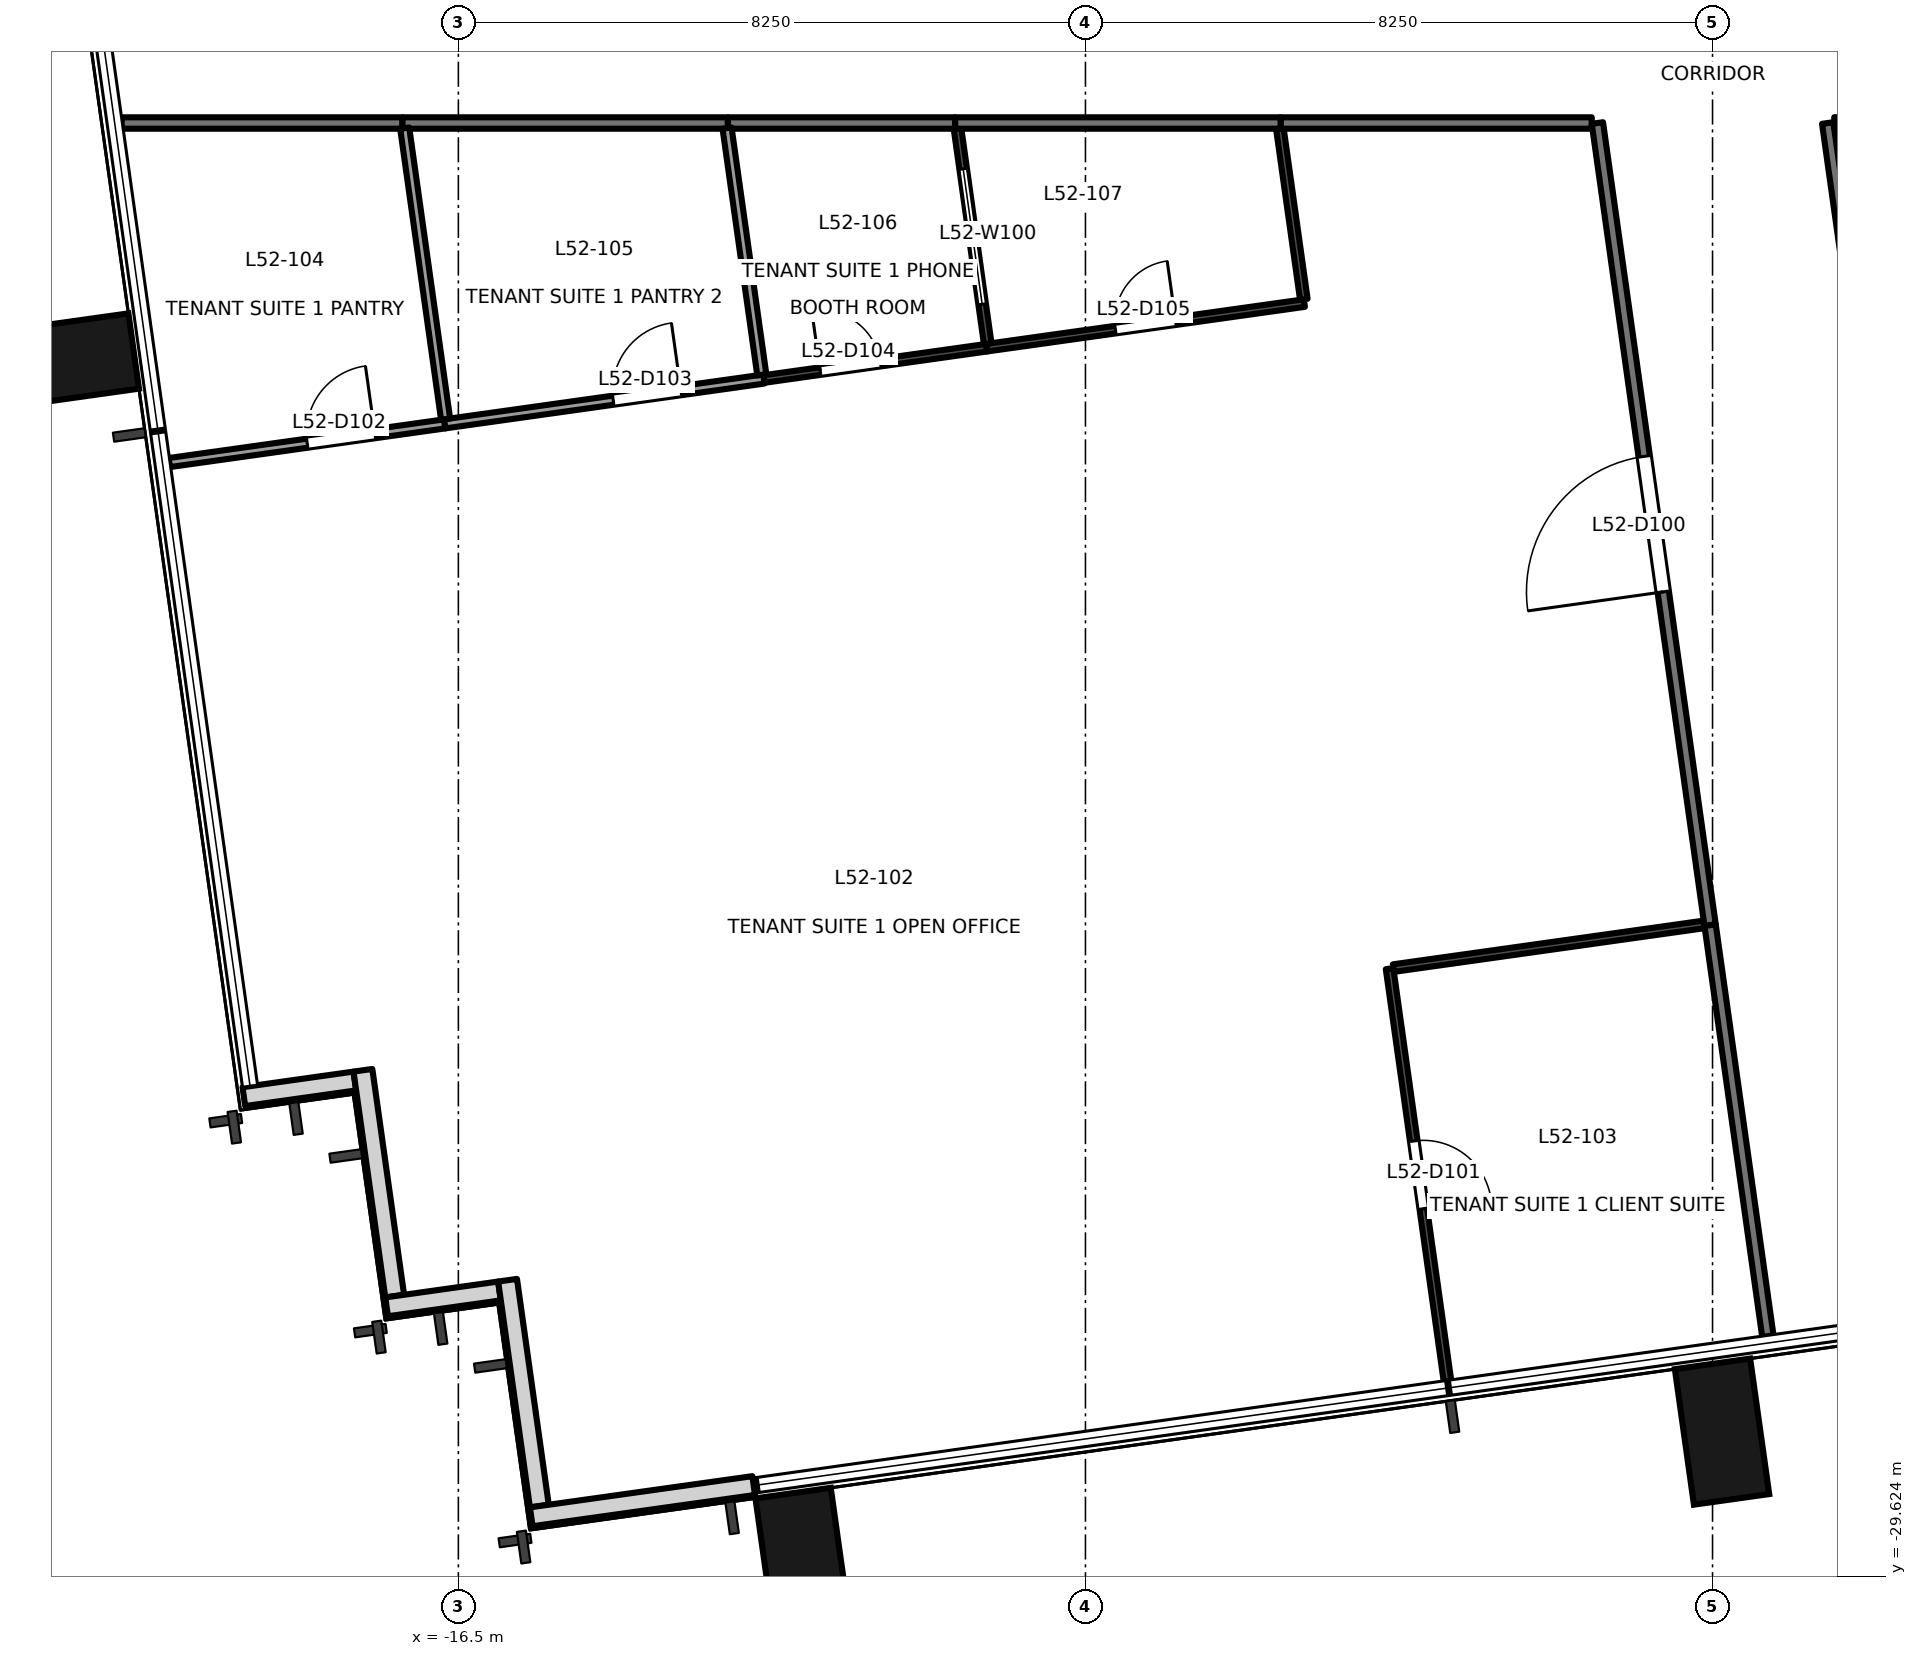
"""IFC4 building model, lengths in metres.
Left out: names, types, materials, properties, quantities, classifications, styles, units other than length and angle.
Written with IfcOpenShell. Run it as: python <this file> out.ifc"""

import sys

from ifc_helpers import new_model, si_unit, direction, frame, frame_2d, origin, origin_2d, place, context, subcontext, project, spatial, rectangle, extrude, element, fill, save


model = new_model("IFC4")
c1 = context("Model", 3, precision=1e-05, world=origin(), true_north=direction((0.0, 1.0)))
c2 = subcontext(c1, "Body", "Model", "MODEL_VIEW")
j1 = project(units=[si_unit("LENGTHUNIT", "METRE"), si_unit("PLANEANGLEUNIT", "RADIAN")], contexts=[c1])
p1 = place(None, origin())
s1 = spatial("IfcSite", under=j1, at=p1, CompositionType="ELEMENT")
p2 = place(p1, origin())
s2 = spatial("IfcBuilding", under=s1, at=p2, CompositionType="ELEMENT")
p3 = place(p2, frame((0.0, 0.0, 229.1)))
s3 = spatial("IfcBuildingStorey", under=s2, at=p3, CompositionType="ELEMENT", Elevation=229.1)
for number, where, z_axis, x_axis in (
    (1, (-11.971, -29.416, -0.2), (0.0, 0.0, 1.0), (0.99, 0.139, 0.0)),
    (2, (0.125, -27.716, -0.2), (0.0, 0.0, 1.0), (0.99, 0.139, 0.0)),
    (3, (-21.663, -13.625, -0.2), (0.0, 0.0, 1.0), (-0.139, 0.99, 0.0)),
):
    element("IfcColumn", number, at=place(p3, frame(where, z_axis=z_axis, x_axis=x_axis)), inside=s3, PredefinedType="COLUMN", context=c2, shape_type="SweptSolid", body=[
        extrude(rectangle(XDim=1.0, YDim=1.8, at=origin_2d()), origin(), (0.0, 0.0, 1.0), 3.9),
    ])
p4 = place(p3, frame((-19.322, -23.309, 0.0), z_axis=(0.0, 0.0, 1.0), x_axis=(0.990235520307, 0.13940449893, 0.0)))
e4 = element("IfcWall", 4, at=p4, inside=s3, PredefinedType="SOLIDWALL", context=c2, shape_type="SweptSolid", body=[
    extrude(rectangle(XDim=1.475, YDim=0.25, at=frame_2d((0.737, 0.0))), origin(), (0.0, 0.0, 1.0), 3.7),
])
p5 = place(p3, frame((-17.756, -22.962, 0.0), z_axis=(0.0, 0.0, 1.0), x_axis=(0.139393225799, -0.990237107263, 0.0)))
e5 = element("IfcWall", 5, at=p5, inside=s3, PredefinedType="SOLIDWALL", context=c2, shape_type="SweptSolid", body=[
    extrude(rectangle(XDim=3.0, YDim=0.25, at=frame_2d((1.5, 0.0))), origin(), (0.0, 0.0, 1.0), 3.7),
])
p6 = place(p3, frame((-17.444, -26.074, 0.0), z_axis=(0.0, 0.0, 1.0), x_axis=(0.990240434918, 0.139369584395, 0.0)))
e6 = element("IfcWall", 6, at=p6, inside=s3, PredefinedType="SOLIDWALL", context=c2, shape_type="SweptSolid", body=[
    extrude(rectangle(XDim=1.5, YDim=0.25, at=frame_2d((0.75, 0.0))), origin(), (0.0, 0.0, 1.0), 3.7),
])
p7 = place(p3, frame((-15.853, -25.724, 0.0), z_axis=(0.0, 0.0, 1.0), x_axis=(0.139302206688, -0.990249915532, 0.0)))
e7 = element("IfcWall", 7, at=p7, inside=s3, PredefinedType="SOLIDWALL", context=c2, shape_type="SweptSolid", body=[
    extrude(rectangle(XDim=3.0, YDim=0.25, at=frame_2d((1.5, 0.0))), origin(), (0.0, 0.0, 1.0), 3.7),
])
p8 = place(p3, frame((-15.541, -28.836, 0.0), z_axis=(0.0, 0.0, 1.0), x_axis=(0.990285396533, 0.139049751574, 0.0)))
e8 = element("IfcWall", 8, at=p8, inside=s3, PredefinedType="SOLIDWALL", context=c2, shape_type="SweptSolid", body=[
    extrude(rectangle(XDim=2.955, YDim=0.25, at=frame_2d((1.478, 0.0))), origin(), (0.0, 0.0, 1.0), 3.7),
])
p9 = place(p3, frame((-1.589, -10.5, 0.0), z_axis=(0.0, 0.0, 1.0), x_axis=(-1.0, 0.0, 0.0)))
e9 = element("IfcWall", 9, at=p9, inside=s3, PredefinedType="PARTITIONING", context=c2, shape_type="SweptSolid", body=[
    extrude(rectangle(XDim=4.094, YDim=0.15, at=frame_2d((2.047, 0.0))), origin(), (0.0, 0.0, 1.0), 2.8),
])
p10 = place(p3, frame((-0.032, -21.053, 0.0), z_axis=(0.0, 0.0, 1.0), x_axis=(-0.139153385275, 0.9902708394, 0.0)))
e10 = element("IfcWall", 10, at=p10, inside=s3, PredefinedType="PARTITIONING", context=c2, shape_type="SweptSolid", body=[
    extrude(rectangle(XDim=10.657, YDim=0.15, at=frame_2d((5.328, 0.0))), origin(), (0.0, 0.0, 1.0), 2.8),
])
p11 = place(p10, frame((4.428, 0.0, 0.0)))
e11 = element("IfcOpeningElement", 11, at=p11, cuts=e10, PredefinedType="OPENING", context=c2, shape_type="SweptSolid", body=[
    extrude(rectangle(XDim=1.8, YDim=2.1, at=frame_2d((0.9, 1.05))), frame((0.0, 0.085, 0.0), z_axis=(0.0, -1.0, 0.0), x_axis=(1.0, 0.0, 0.0)), (0.0, 0.0, 1.0), 0.171),
])
p12 = place(p3, frame((0.728, -26.46, 0.0), z_axis=(0.0, 0.0, 1.0), x_axis=(-0.139192487281, 0.990265343978, 0.0)))
e12 = element("IfcWall", 12, at=p12, inside=s3, PredefinedType="PARTITIONING", context=c2, shape_type="SweptSolid", body=[
    extrude(rectangle(XDim=5.46, YDim=0.15, at=frame_2d((2.73, 0.0))), origin(), (0.0, 0.0, 1.0), 2.8),
])
p13 = place(p3, frame((-17.235, -10.5, 0.0), z_axis=(0.0, 0.0, 1.0), x_axis=(-1.0, 0.0, 0.0)))
e13 = element("IfcWall", 13, at=p13, inside=s3, PredefinedType="PARTITIONING", context=c2, shape_type="SweptSolid", body=[
    extrude(rectangle(XDim=3.695, YDim=0.15, at=frame_2d((1.847, 0.0))), origin(), (0.0, 0.0, 1.0), 3.7),
])
p14 = place(p3, frame((-12.954, -10.5, 0.0), z_axis=(0.0, 0.0, 1.0), x_axis=(-1.0, 0.0, 0.0)))
e14 = element("IfcWall", 14, at=p14, inside=s3, PredefinedType="PARTITIONING", context=c2, shape_type="SweptSolid", body=[
    extrude(rectangle(XDim=4.281, YDim=0.15, at=frame_2d((2.141, 0.0))), origin(), (0.0, 0.0, 1.0), 3.7),
])
p15 = place(p3, frame((-9.964, -10.5, 0.0), z_axis=(0.0, 0.0, 1.0), x_axis=(-1.0, 0.0, 0.0)))
e15 = element("IfcWall", 15, at=p15, inside=s3, PredefinedType="PARTITIONING", context=c2, shape_type="SweptSolid", body=[
    extrude(rectangle(XDim=2.99, YDim=0.15, at=frame_2d((1.495, 0.0))), origin(), (0.0, 0.0, 1.0), 3.7),
])
p16 = place(p3, frame((-5.683, -10.5, 0.0), z_axis=(0.0, 0.0, 1.0), x_axis=(-1.0, 0.0, 0.0)))
e16 = element("IfcWall", 16, at=p16, inside=s3, PredefinedType="PARTITIONING", context=c2, shape_type="SweptSolid", body=[
    extrude(rectangle(XDim=4.281, YDim=0.15, at=frame_2d((2.141, 0.0))), origin(), (0.0, 0.0, 1.0), 2.8),
])
p17 = place(p3, frame((1.515, -10.5, 0.0), z_axis=(0.0, 0.0, 1.0), x_axis=(0.139146821365, -0.990271761742, 0.0)))
e17 = element("IfcWall", 17, at=p17, inside=s3, PredefinedType="PARTITIONING", context=c2, shape_type="SweptSolid", body=[
    extrude(rectangle(XDim=4.779, YDim=0.15, at=frame_2d((2.39, 0.0))), origin(), (0.0, 0.0, 1.0), 3.7),
])
p18 = place(p3, frame((4.524, -10.499, 0.0), z_axis=(0.0, 0.0, 1.0), x_axis=(-1.0, 0.0, 0.0)))
e18 = element("IfcWall", 18, at=p18, inside=s3, PredefinedType="PARTITIONING", context=c2, shape_type="SweptSolid", body=[
    extrude(rectangle(XDim=2.923, YDim=0.15, at=frame_2d((1.461, 0.0))), origin(), (0.0, 0.0, 1.0), 2.8),
])
p19 = place(p3, frame((-4.249, -21.625, 0.0), z_axis=(0.0, 0.0, 1.0), x_axis=(0.13906298859, -0.990283537783, 0.0)))
e19 = element("IfcWall", 19, at=p19, inside=s3, PredefinedType="PARTITIONING", context=c2, shape_type="SweptSolid", body=[
    extrude(rectangle(XDim=5.479, YDim=0.1, at=frame_2d((2.74, 0.0))), origin(), (0.0, 0.0, 1.0), 3.7),
])
p20 = place(p19, frame((2.29, 0.0, 0.0)))
e20 = element("IfcOpeningElement", 20, at=p20, cuts=e19, PredefinedType="OPENING", context=c2, shape_type="SweptSolid", body=[
    extrude(rectangle(XDim=0.9, YDim=2.1, at=frame_2d((0.45, 1.05))), frame((0.0, 0.061, 0.0), z_axis=(0.0, -1.0, 0.0), x_axis=(1.0, 0.0, 0.0)), (0.0, 0.0, 1.0), 0.121),
])
p21 = place(p3, frame((-0.109, -21.043, 0.0), z_axis=(0.0, 0.0, 1.0), x_axis=(-0.990263837068, -0.139203207563, 0.0)))
e21 = element("IfcWall", 21, at=p21, inside=s3, PredefinedType="PARTITIONING", context=c2, shape_type="SweptSolid", body=[
    extrude(rectangle(XDim=4.13, YDim=0.1, at=frame_2d((2.065, 0.0))), origin(), (0.0, 0.0, 1.0), 2.8),
])
p22 = place(p3, frame((-20.303, -14.967, 0.0), z_axis=(0.0, 0.0, 1.0), x_axis=(0.990278989802, 0.139095371445, 0.0)))
e22 = element("IfcWall", 22, at=p22, inside=s3, PredefinedType="PARTITIONING", context=c2, shape_type="SweptSolid", body=[
    extrude(rectangle(XDim=3.66, YDim=0.12, at=frame_2d((1.83, 0.0))), origin(), (0.0, 0.0, 1.0), 3.7),
])
p23 = place(p22, frame((1.832, 0.0, 0.0)))
e23 = element("IfcOpeningElement", 23, at=p23, cuts=e22, PredefinedType="OPENING", context=c2, shape_type="SweptSolid", body=[
    extrude(rectangle(XDim=0.9, YDim=2.1, at=frame_2d((0.45, 1.05))), frame((0.0, 0.071, 0.0), z_axis=(0.0, -1.0, 0.0), x_axis=(1.0, 0.0, 0.0)), (0.0, 0.0, 1.0), 0.141),
])
p24 = place(p3, frame((-16.679, -14.458, 0.0), z_axis=(0.0, 0.0, 1.0), x_axis=(0.990269352743, 0.139163964508, 0.0)))
e24 = element("IfcWall", 24, at=p24, inside=s3, PredefinedType="PARTITIONING", context=c2, shape_type="SweptSolid", body=[
    extrude(rectangle(XDim=4.24, YDim=0.12, at=frame_2d((2.12, 0.0))), origin(), (0.0, 0.0, 1.0), 3.7),
])
p25 = place(p24, frame((2.238, 0.0, 0.0)))
e25 = element("IfcOpeningElement", 25, at=p25, cuts=e24, PredefinedType="OPENING", context=c2, shape_type="SweptSolid", body=[
    extrude(rectangle(XDim=0.9, YDim=2.1, at=frame_2d((0.45, 1.05))), frame((0.0, 0.071, 0.0), z_axis=(0.0, -1.0, 0.0), x_axis=(1.0, 0.0, 0.0)), (0.0, 0.0, 1.0), 0.141),
])
p26 = place(p3, frame((-12.48, -13.868, 0.0), z_axis=(0.0, 0.0, 1.0), x_axis=(0.990270259545, 0.139157511691, 0.0)))
e26 = element("IfcWall", 26, at=p26, inside=s3, PredefinedType="PARTITIONING", context=c2, shape_type="SweptSolid", body=[
    extrude(rectangle(XDim=2.96, YDim=0.1, at=frame_2d((1.48, 0.0))), origin(), (0.0, 0.0, 1.0), 3.7),
])
p27 = place(p26, frame((0.748, 0.0, 0.0)))
e27 = element("IfcOpeningElement", 27, at=p27, cuts=e26, PredefinedType="OPENING", context=c2, shape_type="SweptSolid", body=[
    extrude(rectangle(XDim=0.8, YDim=2.1, at=frame_2d((0.4, 1.05))), frame((0.0, 0.061, 0.0), z_axis=(0.0, -1.0, 0.0), x_axis=(1.0, 0.0, 0.0)), (0.0, 0.0, 1.0), 0.121),
])
p28 = place(p3, frame((-9.549, -13.456, 0.0), z_axis=(0.0, 0.0, 1.0), x_axis=(0.99027315077, 0.139136935655, 0.0)))
e28 = element("IfcWall", 28, at=p28, inside=s3, PredefinedType="PARTITIONING", context=c2, shape_type="SweptSolid", body=[
    extrude(rectangle(XDim=4.22, YDim=0.1, at=frame_2d((2.11, 0.0))), origin(), (0.0, 0.0, 1.0), 2.8),
])
p29 = place(p28, frame((1.71, 0.0, 0.0)))
e29 = element("IfcOpeningElement", 29, at=p29, cuts=e28, PredefinedType="OPENING", context=c2, shape_type="SweptSolid", body=[
    extrude(rectangle(XDim=0.8, YDim=2.1, at=frame_2d((0.4, 1.05))), frame((0.0, 0.061, 0.0), z_axis=(0.0, -1.0, 0.0), x_axis=(1.0, 0.0, 0.0)), (0.0, 0.0, 1.0), 0.121),
])
p30 = place(p3, frame((-5.377, -12.819, 0.0), z_axis=(0.0, 0.0, 1.0), x_axis=(-0.139090262588, 0.990279707382, 0.0)))
e30 = element("IfcWall", 30, at=p30, inside=s3, PredefinedType="PARTITIONING", context=c2, shape_type="SweptSolid", body=[
    extrude(rectangle(XDim=2.273, YDim=0.1, at=frame_2d((1.137, 0.0))), origin(), (0.0, 0.0, 1.0), 3.7),
])
p31 = place(p3, frame((-17.206, -10.567, 0.0), z_axis=(0.0, 0.0, 1.0), x_axis=(0.139158089335, -0.990270178372, 0.0)))
e31 = element("IfcWall", 31, at=p31, inside=s3, PredefinedType="PARTITIONING", context=c2, shape_type="SweptSolid", body=[
    extrude(rectangle(XDim=3.867, YDim=0.12, at=frame_2d((1.933, 0.0))), origin(), (0.0, 0.0, 1.0), 3.7),
])
p32 = place(p3, frame((-12.965, -10.567, 0.0), z_axis=(0.0, 0.0, 1.0), x_axis=(0.139460290977, -0.990227664348, 0.0)))
e32 = element("IfcWall", 32, at=p32, inside=s3, PredefinedType="PARTITIONING", context=c2, shape_type="SweptSolid", body=[
    extrude(rectangle(XDim=3.277, YDim=0.12, at=frame_2d((1.639, 0.0))), origin(), (0.0, 0.0, 1.0), 3.7),
])
p33 = place(p3, frame((-9.934, -10.568, 0.0), z_axis=(0.0, 0.0, 1.0), x_axis=(0.139092802353, -0.990279350655, 0.0)))
e33 = element("IfcWall", 33, at=p33, inside=s3, PredefinedType="PARTITIONING", context=c2, shape_type="SweptSolid", body=[
    extrude(rectangle(XDim=2.863, YDim=0.1, at=frame_2d((1.431, 0.0))), origin(), (0.0, 0.0, 1.0), 3.7),
])
p34 = place(p33, frame((0.54, 0.0, 0.9)))
e34 = element("IfcOpeningElement", 34, at=p34, cuts=e33, PredefinedType="OPENING", context=c2, shape_type="SweptSolid", body=[
    extrude(rectangle(XDim=1.8, YDim=1.2, at=frame_2d((0.9, 0.6))), frame((0.0, 0.061, 0.0), z_axis=(0.0, -1.0, 0.0), x_axis=(1.0, 0.0, 0.0)), (0.0, 0.0, 1.0), 0.121),
])
p35 = place(p11, origin())
e35 = element("IfcDoor", 35, at=p35, inside=s3, OperationType="DOUBLE_DOOR_SINGLE_SWING", PredefinedType="DOOR", context=c2, shape_type="SweptSolid", body=[
    extrude(rectangle(XDim=1.8, YDim=2.1, at=frame_2d((0.9, 1.05))), frame((0.0, 0.025, 0.0), z_axis=(0.0, -1.0, 0.0), x_axis=(1.0, 0.0, 0.0)), (0.0, 0.0, 1.0), 0.05),
])
fill(e11, e35)
p36 = place(p20, origin())
e36 = element("IfcDoor", 36, at=p36, inside=s3, OperationType="SINGLE_SWING_RIGHT", PredefinedType="DOOR", context=c2, shape_type="SweptSolid", body=[
    extrude(rectangle(XDim=0.9, YDim=2.1, at=frame_2d((0.45, 1.05))), frame((0.0, 0.025, 0.0), z_axis=(0.0, -1.0, 0.0), x_axis=(1.0, 0.0, 0.0)), (0.0, 0.0, 1.0), 0.05),
])
fill(e20, e36)
p37 = place(p23, origin())
e37 = element("IfcDoor", 37, at=p37, inside=s3, OperationType="SINGLE_SWING_RIGHT", PredefinedType="DOOR", context=c2, shape_type="SweptSolid", body=[
    extrude(rectangle(XDim=0.9, YDim=2.1, at=frame_2d((0.45, 1.05))), frame((0.0, 0.025, 0.0), z_axis=(0.0, -1.0, 0.0), x_axis=(1.0, 0.0, 0.0)), (0.0, 0.0, 1.0), 0.05),
])
fill(e23, e37)
p38 = place(p25, origin())
e38 = element("IfcDoor", 38, at=p38, inside=s3, OperationType="SINGLE_SWING_RIGHT", PredefinedType="DOOR", context=c2, shape_type="SweptSolid", body=[
    extrude(rectangle(XDim=0.9, YDim=2.1, at=frame_2d((0.45, 1.05))), frame((0.0, 0.025, 0.0), z_axis=(0.0, -1.0, 0.0), x_axis=(1.0, 0.0, 0.0)), (0.0, 0.0, 1.0), 0.05),
])
fill(e25, e38)
p39 = place(p27, origin())
e39 = element("IfcDoor", 39, at=p39, inside=s3, OperationType="SINGLE_SWING_LEFT", PredefinedType="DOOR", context=c2, shape_type="SweptSolid", body=[
    extrude(rectangle(XDim=0.8, YDim=2.1, at=frame_2d((0.4, 1.05))), frame((0.0, 0.025, 0.0), z_axis=(0.0, -1.0, 0.0), x_axis=(1.0, 0.0, 0.0)), (0.0, 0.0, 1.0), 0.05),
])
fill(e27, e39)
p40 = place(p29, origin())
e40 = element("IfcDoor", 40, at=p40, inside=s3, OperationType="SINGLE_SWING_RIGHT", PredefinedType="DOOR", context=c2, shape_type="SweptSolid", body=[
    extrude(rectangle(XDim=0.8, YDim=2.1, at=frame_2d((0.4, 1.05))), frame((0.0, 0.025, 0.0), z_axis=(0.0, -1.0, 0.0), x_axis=(1.0, 0.0, 0.0)), (0.0, 0.0, 1.0), 0.05),
])
fill(e29, e40)
p41 = place(p34, origin())
e41 = element("IfcWindow", 41, at=p41, inside=s3, PartitioningType="SINGLE_PANEL", PredefinedType="WINDOW", context=c2, shape_type="SweptSolid", body=[
    extrude(rectangle(XDim=1.8, YDim=1.2, at=frame_2d((0.9, 0.6))), frame((0.0, 0.03, 0.0), z_axis=(0.0, -1.0, 0.0), x_axis=(1.0, 0.0, 0.0)), (0.0, 0.0, 1.0), 0.06),
])
fill(e34, e41)
save(model, sys.argv[1])
